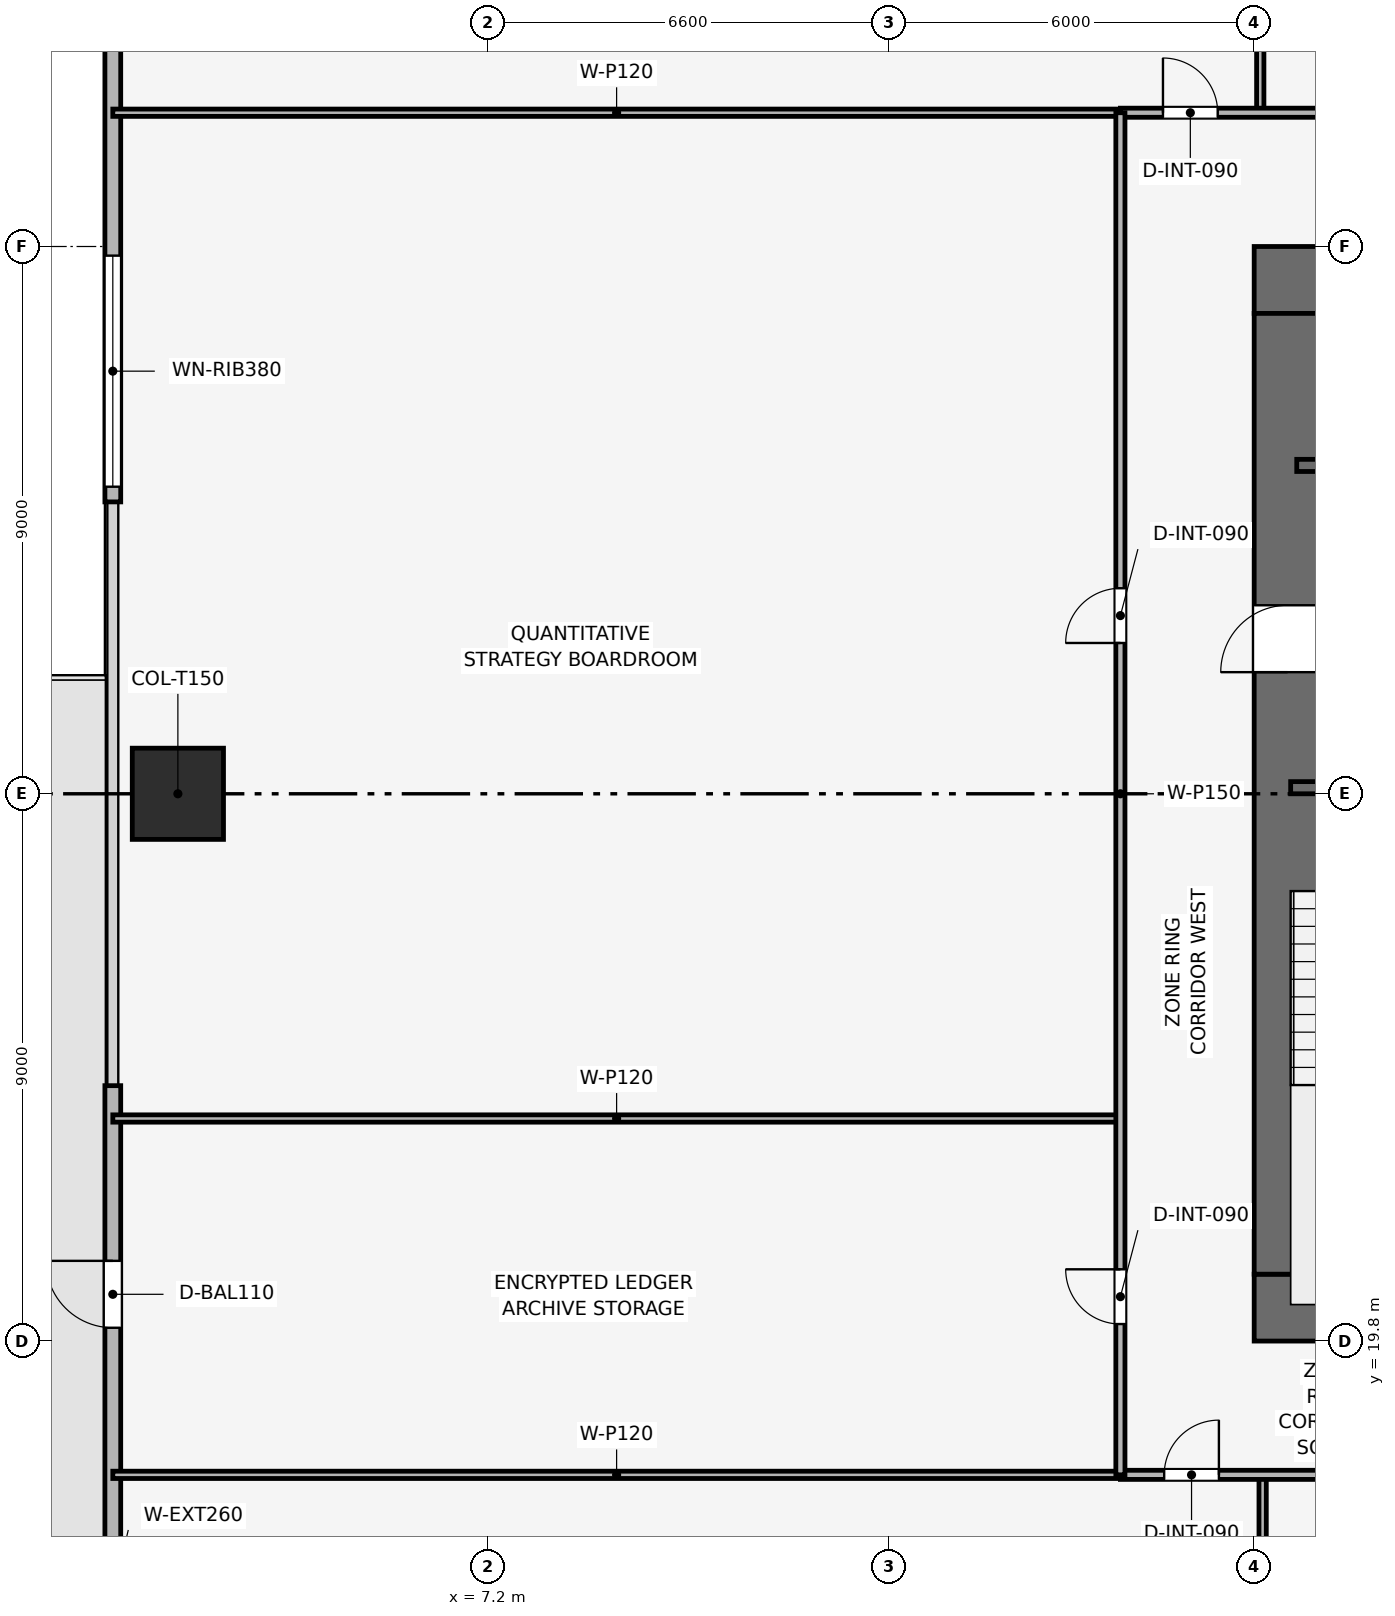
"""IFC4 building model, lengths in metres.
Left out: names, types, materials, properties, quantities, classifications, styles, units other than length and angle.
Written with IfcOpenShell. Run it as: python <this file> out.ifc"""

import sys

from ifc_helpers import new_model, si_unit, direction, frame, frame_2d, origin, origin_2d, place, context, subcontext, project, spatial, rectangle, extrude, element, fill, save


model = new_model("IFC4")
c1 = context("Model", 3, precision=1e-05, world=origin(), true_north=direction((0.0, 1.0)))
c2 = subcontext(c1, "Body", "Model", "MODEL_VIEW")
j1 = project(units=[si_unit("LENGTHUNIT", "METRE"), si_unit("PLANEANGLEUNIT", "RADIAN")], contexts=[c1])
p1 = place(None, origin())
s1 = spatial("IfcSite", under=j1, at=p1, CompositionType="ELEMENT")
p2 = place(p1, origin())
s2 = spatial("IfcBuilding", under=s1, at=p2, CompositionType="ELEMENT")
p3 = place(p2, frame((0.0, 0.0, 33.9)))
s3 = spatial("IfcBuildingStorey", under=s2, at=p3, CompositionType="ELEMENT", Elevation=33.9)
p4 = place(p3, frame((19.8, 20.35, 0.0), z_axis=(0.0, 0.0, 1.0), x_axis=(1.0, 0.0, 0.0)))
e1 = element("IfcWall", 1, at=p4, inside=s3, PredefinedType="SHEAR", context=c2, shape_type="SweptSolid", body=[
    extrude(rectangle(XDim=18.0, YDim=1.1, at=frame_2d((9.0, 0.0))), origin(), (0.0, 0.0, 1.0), 3.9),
])
p5 = place(p4, frame((8.4, 0.0, 0.0)))
e2 = element("IfcOpeningElement", 2, at=p5, cuts=e1, PredefinedType="OPENING", context=c2, shape_type="SweptSolid", body=[
    extrude(rectangle(XDim=1.2, YDim=2.2, at=frame_2d((0.6, 1.1))), frame((0.0, 0.56, 0.0), z_axis=(0.0, -1.0, 0.0), x_axis=(1.0, 0.0, 0.0)), (0.0, 0.0, 1.0), 1.12),
])
p6 = place(p3, frame((19.8, 37.25, 0.0), z_axis=(0.0, 0.0, 1.0), x_axis=(1.0, 0.0, 0.0)))
e3 = element("IfcWall", 3, at=p6, inside=s3, PredefinedType="SHEAR", context=c2, shape_type="SweptSolid", body=[
    extrude(rectangle(XDim=18.0, YDim=1.1, at=frame_2d((9.0, 0.0))), origin(), (0.0, 0.0, 1.0), 3.9),
])
p7 = place(p6, frame((7.05, 0.0, 0.0)))
e4 = element("IfcOpeningElement", 4, at=p7, cuts=e3, PredefinedType="OPENING", context=c2, shape_type="SweptSolid", body=[
    extrude(rectangle(XDim=1.1, YDim=2.15, at=frame_2d((0.55, 1.075))), frame((0.0, 0.56, 0.0), z_axis=(0.0, -1.0, 0.0), x_axis=(1.0, 0.0, 0.0)), (0.0, 0.0, 1.0), 1.12),
])
p8 = place(p3, frame((20.35, 20.9, 0.0), z_axis=(0.0, 0.0, 1.0), x_axis=(0.0, 1.0, 0.0)))
e5 = element("IfcWall", 5, at=p8, inside=s3, PredefinedType="SHEAR", context=c2, shape_type="SweptSolid", body=[
    extrude(rectangle(XDim=15.8, YDim=1.1, at=frame_2d((7.9, 0.0))), origin(), (0.0, 0.0, 1.0), 3.9),
])
p9 = place(p8, frame((9.9, 0.0, 0.0)))
e6 = element("IfcOpeningElement", 6, at=p9, cuts=e5, PredefinedType="OPENING", context=c2, shape_type="SweptSolid", body=[
    extrude(rectangle(XDim=1.1, YDim=2.15, at=frame_2d((0.55, 1.075))), frame((0.0, 0.56, 0.0), z_axis=(0.0, -1.0, 0.0), x_axis=(1.0, 0.0, 0.0)), (0.0, 0.0, 1.0), 1.12),
])
p10 = place(p3, frame((2.1, 28.8, 0.003), z_axis=(0.0, 0.0, 1.0), x_axis=(1.0, 0.0, 0.0)))
e7 = element("IfcColumn", 7, at=p10, inside=s3, PredefinedType="COLUMN", context=c2, shape_type="SweptSolid", body=[
    extrude(rectangle(XDim=1.5, YDim=1.5, at=origin_2d()), origin(), (0.0, 0.0, 1.0), 3.644),
])
p11 = place(p3, frame((1.03, 8.7, 0.0), z_axis=(0.0, 0.0, 1.0), x_axis=(0.0, 1.0, 0.0)))
e8 = element("IfcWall", 8, at=p11, inside=s3, PredefinedType="SOLIDWALL", context=c2, shape_type="SweptSolid", body=[
    extrude(rectangle(XDim=15.3, YDim=0.26, at=frame_2d((7.65, 0.0))), origin(), (0.0, 0.0, 1.0), 3.65),
])
p12 = place(p11, frame((11.319, 0.0, 0.0)))
e9 = element("IfcOpeningElement", 9, at=p12, cuts=e8, PredefinedType="OPENING", context=c2, shape_type="SweptSolid", body=[
    extrude(rectangle(XDim=1.1, YDim=2.2, at=frame_2d((0.55, 1.1))), frame((0.0, 0.14, 0.0), z_axis=(0.0, -1.0, 0.0), x_axis=(1.0, 0.0, 0.0)), (0.0, 0.0, 1.0), 0.28),
])
p13 = place(p3, frame((1.03, 33.6, 0.0), z_axis=(0.0, 0.0, 1.0), x_axis=(0.0, 1.0, 0.0)))
e10 = element("IfcWall", 10, at=p13, inside=s3, PredefinedType="SOLIDWALL", context=c2, shape_type="SweptSolid", body=[
    extrude(rectangle(XDim=15.3, YDim=0.26, at=frame_2d((7.65, 0.0))), origin(), (0.0, 0.0, 1.0), 3.65),
])
p14 = place(p13, frame((0.25, 0.0, 0.9)))
e11 = element("IfcOpeningElement", 11, at=p14, cuts=e10, PredefinedType="OPENING", context=c2, shape_type="SweptSolid", body=[
    extrude(rectangle(XDim=3.8, YDim=1.9, at=frame_2d((1.9, 0.95))), frame((0.0, 0.14, 0.0), z_axis=(0.0, -1.0, 0.0), x_axis=(1.0, 0.0, 0.0)), (0.0, 0.0, 1.0), 0.28),
])
p15 = place(p3, frame((20.4, 28.9, 0.0), z_axis=(0.0, 0.0, 1.0), x_axis=(1.0, 0.0, 0.0)))
e12 = element("IfcWall", 12, at=p15, inside=s3, PredefinedType="SHEAR", context=c2, shape_type="SweptSolid", body=[
    extrude(rectangle(XDim=3.15, YDim=0.2, at=frame_2d((1.575, 0.0))), origin(), (0.0, 0.0, 1.0), 3.65),
])
p16 = place(p15, frame((0.8, 0.0, 0.0)))
e13 = element("IfcOpeningElement", 13, at=p16, cuts=e12, PredefinedType="OPENING", context=c2, shape_type="SweptSolid", body=[
    extrude(rectangle(XDim=1.0, YDim=2.1, at=frame_2d((0.5, 1.05))), frame((0.0, 0.11, 0.0), z_axis=(0.0, -1.0, 0.0), x_axis=(1.0, 0.0, 0.0)), (0.0, 0.0, 1.0), 0.22),
])
p17 = place(p3, frame((20.5, 34.2, 0.0), z_axis=(0.0, 0.0, 1.0), x_axis=(1.0, 0.0, 0.0)))
e14 = element("IfcWall", 14, at=p17, inside=s3, PredefinedType="SHEAR", context=c2, shape_type="SweptSolid", body=[
    extrude(rectangle(XDim=3.05, YDim=0.2, at=frame_2d((1.525, 0.0))), origin(), (0.0, 0.0, 1.0), 3.65),
])
p18 = place(p17, frame((0.75, 0.0, 0.0)))
e15 = element("IfcOpeningElement", 15, at=p18, cuts=e14, PredefinedType="OPENING", context=c2, shape_type="SweptSolid", body=[
    extrude(rectangle(XDim=1.1, YDim=2.15, at=frame_2d((0.55, 1.075))), frame((0.0, 0.11, 0.0), z_axis=(0.0, -1.0, 0.0), x_axis=(1.0, 0.0, 0.0)), (0.0, 0.0, 1.0), 0.22),
])
for number, where, z_axis, x_axis in (
    (16, (19.939, 1.03, 0.0), (0.0, 0.0, 1.0), (0.0, 1.0, 0.0)),
    (17, (19.9, 40.0, 0.0), (0.0, 0.0, 1.0), (0.0, 1.0, 0.0)),
    (18, (1.03, 17.6, 0.0), (0.0, 0.0, 1.0), (1.0, 0.0, 0.0)),
    (19, (1.03, 40.0, 0.0), (0.0, 0.0, 1.0), (1.0, 0.0, 0.0)),
    (20, (1.03, 23.46, 0.0), (0.0, 0.0, 1.0), (1.0, 0.0, 0.0)),
):
    element("IfcWall", number, at=place(p3, frame(where, z_axis=z_axis, x_axis=x_axis)), inside=s3, PredefinedType="PARTITIONING", context=c2, shape_type="SweptSolid", body=[
        extrude(rectangle(XDim=16.57, YDim=0.12, at=frame_2d((8.285, 0.0))), origin(), (0.0, 0.0, 1.0), 2.935),
    ])
p19 = place(p3, frame((17.6, 17.6, 0.0), z_axis=(0.0, 0.0, 1.0), x_axis=(1.0, 0.0, 0.0)))
e21 = element("IfcWall", 21, at=p19, inside=s3, PredefinedType="PARTITIONING", context=c2, shape_type="SweptSolid", body=[
    extrude(rectangle(XDim=22.4, YDim=0.15, at=frame_2d((11.2, 0.0))), origin(), (0.0, 0.0, 1.0), 3.085),
])
p20 = place(p19, frame((0.72, 0.0, 0.0)))
e22 = element("IfcOpeningElement", 22, at=p20, cuts=e21, PredefinedType="OPENING", context=c2, shape_type="SweptSolid", body=[
    extrude(rectangle(XDim=0.9, YDim=2.1, at=frame_2d((0.45, 1.05))), frame((0.0, 0.085, 0.0), z_axis=(0.0, -1.0, 0.0), x_axis=(1.0, 0.0, 0.0)), (0.0, 0.0, 1.0), 0.17),
])
p21 = place(p19, frame((6.255, 0.0, 0.0)))
e23 = element("IfcOpeningElement", 23, at=p21, cuts=e21, PredefinedType="OPENING", context=c2, shape_type="SweptSolid", body=[
    extrude(rectangle(XDim=0.9, YDim=2.1, at=frame_2d((0.45, 1.05))), frame((0.0, 0.085, 0.0), z_axis=(0.0, -1.0, 0.0), x_axis=(1.0, 0.0, 0.0)), (0.0, 0.0, 1.0), 0.17),
])
p22 = place(p19, frame((16.285, 0.0, 0.0)))
e24 = element("IfcOpeningElement", 24, at=p22, cuts=e21, PredefinedType="OPENING", context=c2, shape_type="SweptSolid", body=[
    extrude(rectangle(XDim=0.9, YDim=2.1, at=frame_2d((0.45, 1.05))), frame((0.0, 0.085, 0.0), z_axis=(0.0, -1.0, 0.0), x_axis=(1.0, 0.0, 0.0)), (0.0, 0.0, 1.0), 0.17),
])
p23 = place(p3, frame((17.6, 40.0, 0.0), z_axis=(0.0, 0.0, 1.0), x_axis=(1.0, 0.0, 0.0)))
e25 = element("IfcWall", 25, at=p23, inside=s3, PredefinedType="PARTITIONING", context=c2, shape_type="SweptSolid", body=[
    extrude(rectangle(XDim=22.4, YDim=0.15, at=frame_2d((11.2, 0.0))), origin(), (0.0, 0.0, 1.0), 3.085),
])
p24 = place(p23, frame((0.7, 0.0, 0.0)))
e26 = element("IfcOpeningElement", 26, at=p24, cuts=e25, PredefinedType="OPENING", context=c2, shape_type="SweptSolid", body=[
    extrude(rectangle(XDim=0.9, YDim=2.1, at=frame_2d((0.45, 1.05))), frame((0.0, 0.085, 0.0), z_axis=(0.0, -1.0, 0.0), x_axis=(1.0, 0.0, 0.0)), (0.0, 0.0, 1.0), 0.17),
])
p25 = place(p23, frame((4.888, 0.0, 0.0)))
e27 = element("IfcOpeningElement", 27, at=p25, cuts=e25, PredefinedType="OPENING", context=c2, shape_type="SweptSolid", body=[
    extrude(rectangle(XDim=0.9, YDim=2.1, at=frame_2d((0.45, 1.05))), frame((0.0, 0.085, 0.0), z_axis=(0.0, -1.0, 0.0), x_axis=(1.0, 0.0, 0.0)), (0.0, 0.0, 1.0), 0.17),
])
p26 = place(p23, frame((10.808, 0.0, 0.0)))
e28 = element("IfcOpeningElement", 28, at=p26, cuts=e25, PredefinedType="OPENING", context=c2, shape_type="SweptSolid", body=[
    extrude(rectangle(XDim=0.9, YDim=2.1, at=frame_2d((0.45, 1.05))), frame((0.0, 0.085, 0.0), z_axis=(0.0, -1.0, 0.0), x_axis=(1.0, 0.0, 0.0)), (0.0, 0.0, 1.0), 0.17),
])
p27 = place(p23, frame((17.82, 0.0, 0.0)))
e29 = element("IfcOpeningElement", 29, at=p27, cuts=e25, PredefinedType="OPENING", context=c2, shape_type="SweptSolid", body=[
    extrude(rectangle(XDim=0.9, YDim=2.1, at=frame_2d((0.45, 1.05))), frame((0.0, 0.085, 0.0), z_axis=(0.0, -1.0, 0.0), x_axis=(1.0, 0.0, 0.0)), (0.0, 0.0, 1.0), 0.17),
])
p28 = place(p3, frame((17.6, 17.6, 0.0), z_axis=(0.0, 0.0, 1.0), x_axis=(0.0, 1.0, 0.0)))
e30 = element("IfcWall", 30, at=p28, inside=s3, PredefinedType="PARTITIONING", context=c2, shape_type="SweptSolid", body=[
    extrude(rectangle(XDim=22.4, YDim=0.15, at=frame_2d((11.2, 0.0))), origin(), (0.0, 0.0, 1.0), 3.085),
])
p29 = place(p28, frame((2.48, 0.0, 0.0)))
e31 = element("IfcOpeningElement", 31, at=p29, cuts=e30, PredefinedType="OPENING", context=c2, shape_type="SweptSolid", body=[
    extrude(rectangle(XDim=0.9, YDim=2.1, at=frame_2d((0.45, 1.05))), frame((0.0, 0.085, 0.0), z_axis=(0.0, -1.0, 0.0), x_axis=(1.0, 0.0, 0.0)), (0.0, 0.0, 1.0), 0.17),
])
p30 = place(p28, frame((13.68, 0.0, 0.0)))
e32 = element("IfcOpeningElement", 32, at=p30, cuts=e30, PredefinedType="OPENING", context=c2, shape_type="SweptSolid", body=[
    extrude(rectangle(XDim=0.9, YDim=2.1, at=frame_2d((0.45, 1.05))), frame((0.0, 0.085, 0.0), z_axis=(0.0, -1.0, 0.0), x_axis=(1.0, 0.0, 0.0)), (0.0, 0.0, 1.0), 0.17),
])
p31 = place(p12, origin())
e33 = element("IfcDoor", 33, at=p31, inside=s3, OperationType="SINGLE_SWING_RIGHT", PredefinedType="DOOR", context=c2, shape_type="SweptSolid", body=[
    extrude(rectangle(XDim=1.1, YDim=2.2, at=frame_2d((0.55, 1.1))), frame((0.0, 0.025, 0.0), z_axis=(0.0, -1.0, 0.0), x_axis=(1.0, 0.0, 0.0)), (0.0, 0.0, 1.0), 0.05),
])
fill(e9, e33)
p32 = place(p14, origin())
e34 = element("IfcWindow", 34, at=p32, inside=s3, PartitioningType="SINGLE_PANEL", PredefinedType="WINDOW", context=c2, shape_type="SweptSolid", body=[
    extrude(rectangle(XDim=3.8, YDim=1.9, at=frame_2d((1.9, 0.95))), frame((0.0, 0.03, 0.0), z_axis=(0.0, -1.0, 0.0), x_axis=(1.0, 0.0, 0.0)), (0.0, 0.0, 1.0), 0.06),
])
fill(e11, e34)
p33 = place(p20, origin())
e35 = element("IfcDoor", 35, at=p33, inside=s3, OperationType="SINGLE_SWING_RIGHT", PredefinedType="DOOR", context=c2, shape_type="SweptSolid", body=[
    extrude(rectangle(XDim=0.9, YDim=2.1, at=frame_2d((0.45, 1.05))), frame((0.0, 0.025, 0.0), z_axis=(0.0, -1.0, 0.0), x_axis=(1.0, 0.0, 0.0)), (0.0, 0.0, 1.0), 0.05),
])
fill(e22, e35)
p34 = place(p24, origin())
e36 = element("IfcDoor", 36, at=p34, inside=s3, OperationType="SINGLE_SWING_LEFT", PredefinedType="DOOR", context=c2, shape_type="SweptSolid", body=[
    extrude(rectangle(XDim=0.9, YDim=2.1, at=frame_2d((0.45, 1.05))), frame((0.0, 0.025, 0.0), z_axis=(0.0, -1.0, 0.0), x_axis=(1.0, 0.0, 0.0)), (0.0, 0.0, 1.0), 0.05),
])
fill(e26, e36)
p35 = place(p29, origin())
e37 = element("IfcDoor", 37, at=p35, inside=s3, OperationType="SINGLE_SWING_RIGHT", PredefinedType="DOOR", context=c2, shape_type="SweptSolid", body=[
    extrude(rectangle(XDim=0.9, YDim=2.1, at=frame_2d((0.45, 1.05))), frame((0.0, 0.025, 0.0), z_axis=(0.0, -1.0, 0.0), x_axis=(1.0, 0.0, 0.0)), (0.0, 0.0, 1.0), 0.05),
])
fill(e31, e37)
p36 = place(p30, origin())
e38 = element("IfcDoor", 38, at=p36, inside=s3, OperationType="SINGLE_SWING_LEFT", PredefinedType="DOOR", context=c2, shape_type="SweptSolid", body=[
    extrude(rectangle(XDim=0.9, YDim=2.1, at=frame_2d((0.45, 1.05))), frame((0.0, 0.025, 0.0), z_axis=(0.0, -1.0, 0.0), x_axis=(1.0, 0.0, 0.0)), (0.0, 0.0, 1.0), 0.05),
])
fill(e32, e38)
p37 = place(p9, origin())
e39 = element("IfcDoor", 39, at=p37, inside=s3, OperationType="SINGLE_SWING_LEFT", PredefinedType="DOOR", context=c2, shape_type="SweptSolid", body=[
    extrude(rectangle(XDim=1.1, YDim=2.15, at=frame_2d((0.55, 1.075))), frame((0.0, 0.025, 0.0), z_axis=(0.0, -1.0, 0.0), x_axis=(1.0, 0.0, 0.0)), (0.0, 0.0, 1.0), 0.05),
])
fill(e6, e39)
save(model, sys.argv[1])
